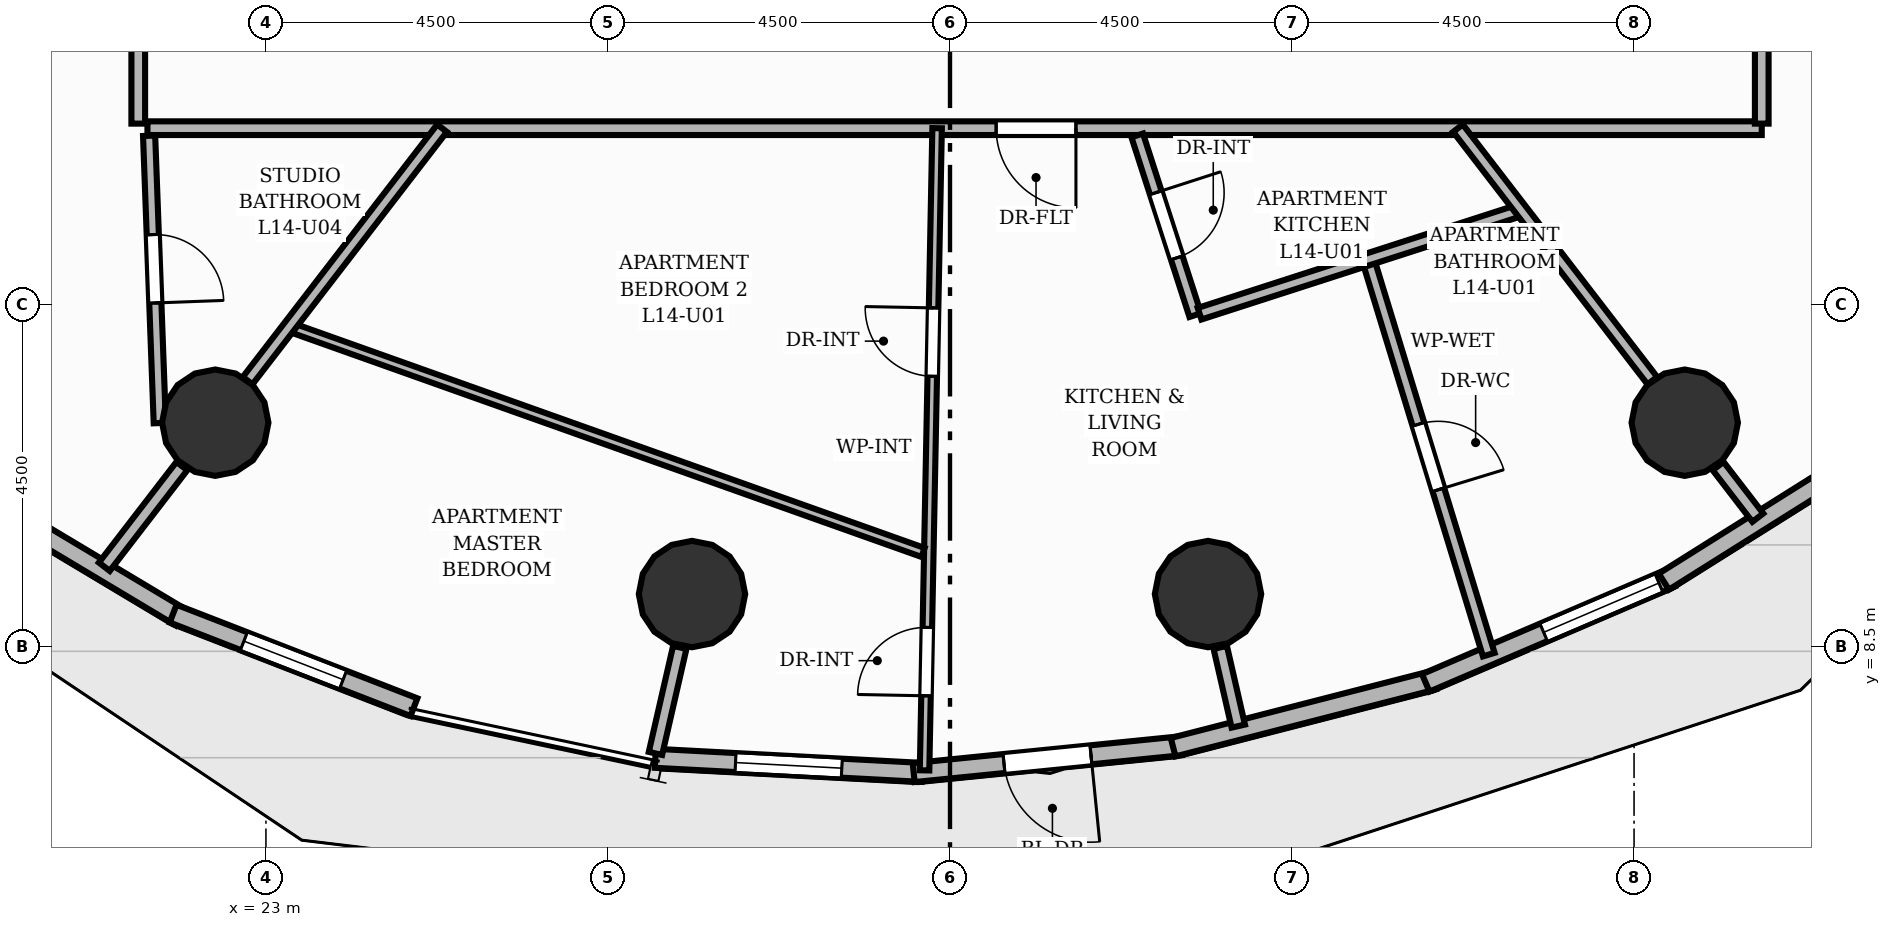
"""IFC4 building model, lengths in metres.
Left out: names, types, materials, properties, quantities, classifications, styles, units other than length and angle.
Written with IfcOpenShell. Run it as: python <this file> out.ifc"""

import sys

from ifc_helpers import new_model, si_unit, direction, frame, frame_2d, origin, origin_2d, place, context, subcontext, project, spatial, rectangle, circle, extrude, element, fill, save


model = new_model("IFC4")
c1 = context("Model", 3, precision=1e-05, world=origin(), true_north=direction((0.0, 1.0)))
c2 = subcontext(c1, "Body", "Model", "MODEL_VIEW")
j1 = project(units=[si_unit("LENGTHUNIT", "METRE"), si_unit("PLANEANGLEUNIT", "RADIAN")], contexts=[c1])
p1 = place(None, origin())
s1 = spatial("IfcSite", under=j1, at=p1, CompositionType="ELEMENT")
p2 = place(p1, origin())
s2 = spatial("IfcBuilding", under=s1, at=p2, CompositionType="ELEMENT")
p3 = place(p2, frame((0.0, 0.0, 50.4)))
s3 = spatial("IfcBuildingStorey", under=s2, at=p3, CompositionType="ELEMENT", Elevation=50.4)
for number, where, z_axis, x_axis in (
    (1, (22.333, 11.445, 0.0), (0.0, 0.0, 1.0), (1.0, 0.0, 0.0)),
    (2, (28.605, 9.19, 0.0), (0.0, 0.0, 1.0), (1.0, 0.0, 0.0)),
    (3, (35.395, 9.19, 0.0), (0.0, 0.0, 1.0), (1.0, 0.0, 0.0)),
    (4, (41.667, 11.445, 0.0), (0.0, 0.0, 1.0), (1.0, 0.0, 0.0)),
):
    element("IfcColumn", number, at=place(p3, frame(where, z_axis=z_axis, x_axis=x_axis)), inside=s3, PredefinedType="COLUMN", context=c2, shape_type="SweptSolid", body=[
        extrude(circle(Radius=0.7, at=origin_2d()), origin(), (0.0, 0.0, 1.0), 3.2),
    ])
p4 = place(p3, frame((21.878, 8.884, 0.0), z_axis=(0.0, 0.0, 1.0), x_axis=(-0.858069400356, 0.513533742001, 0.0)))
e5 = element("IfcWall", 5, at=p4, inside=s3, PredefinedType="SOLIDWALL", context=c2, shape_type="SweptSolid", body=[
    extrude(rectangle(XDim=3.323, YDim=0.25, at=frame_2d((1.661, 0.0))), origin(), (0.0, 0.0, 1.0), 2.96),
])
p5 = place(p3, frame((24.947, 7.702, 0.0), z_axis=(0.0, 0.0, 1.0), x_axis=(-0.932140755825, 0.362096135479, 0.0)))
e6 = element("IfcWall", 6, at=p5, inside=s3, PredefinedType="SOLIDWALL", context=c2, shape_type="SweptSolid", body=[
    extrude(rectangle(XDim=3.399, YDim=0.25, at=frame_2d((1.699, 0.0))), origin(), (0.0, 0.0, 1.0), 2.96),
])
p6 = place(p5, frame((1.0, 0.0, 0.85)))
e7 = element("IfcOpeningElement", 7, at=p6, cuts=e6, PredefinedType="OPENING", context=c2, shape_type="SweptSolid", body=[
    extrude(rectangle(XDim=1.4, YDim=1.55, at=frame_2d((0.7, 0.775))), frame((0.0, 0.135, 0.0), z_axis=(0.0, -1.0, 0.0), x_axis=(1.0, 0.0, 0.0)), (0.0, 0.0, 1.0), 0.27),
])
p7 = place(p3, frame((31.631, 6.844, 0.0), z_axis=(0.0, 0.0, 1.0), x_axis=(-0.99860782827, 0.052748510102, 0.0)))
e8 = element("IfcWall", 8, at=p7, inside=s3, PredefinedType="SOLIDWALL", context=c2, shape_type="SweptSolid", body=[
    extrude(rectangle(XDim=3.513, YDim=0.25, at=frame_2d((1.756, 0.0))), origin(), (0.0, 0.0, 1.0), 2.96),
])
p8 = place(p7, frame((1.056, 0.0, 0.85)))
e9 = element("IfcOpeningElement", 9, at=p8, cuts=e8, PredefinedType="OPENING", context=c2, shape_type="SweptSolid", body=[
    extrude(rectangle(XDim=1.4, YDim=1.55, at=frame_2d((0.7, 0.775))), frame((0.0, 0.135, 0.0), z_axis=(0.0, -1.0, 0.0), x_axis=(1.0, 0.0, 0.0)), (0.0, 0.0, 1.0), 0.27),
])
p9 = place(p3, frame((35.043, 7.194, 0.0), z_axis=(0.0, 0.0, 1.0), x_axis=(-0.994996115016, -0.099913618207, 0.0)))
e10 = element("IfcWall", 10, at=p9, inside=s3, PredefinedType="SOLIDWALL", context=c2, shape_type="SweptSolid", body=[
    extrude(rectangle(XDim=3.538, YDim=0.25, at=frame_2d((1.769, 0.0))), origin(), (0.0, 0.0, 1.0), 2.96),
])
p10 = place(p9, frame((1.194, 0.0, 0.0)))
e11 = element("IfcOpeningElement", 11, at=p10, cuts=e10, PredefinedType="OPENING", context=c2, shape_type="SweptSolid", body=[
    extrude(rectangle(XDim=1.15, YDim=2.2, at=frame_2d((0.575, 1.1))), frame((0.0, 0.135, 0.0), z_axis=(0.0, -1.0, 0.0), x_axis=(1.0, 0.0, 0.0)), (0.0, 0.0, 1.0), 0.27),
])
p11 = place(p3, frame((38.362, 8.057, 0.0), z_axis=(0.0, 0.0, 1.0), x_axis=(-0.968459637573, -0.249170484594, 0.0)))
e12 = element("IfcWall", 12, at=p11, inside=s3, PredefinedType="SOLIDWALL", context=c2, shape_type="SweptSolid", body=[
    extrude(rectangle(XDim=3.538, YDim=0.25, at=frame_2d((1.769, 0.0))), origin(), (0.0, 0.0, 1.0), 2.96),
])
p12 = place(p3, frame((41.489, 9.405, 0.0), z_axis=(0.0, 0.0, 1.0), x_axis=(-0.919263615987, -0.393642482872, 0.0)))
e13 = element("IfcWall", 13, at=p12, inside=s3, PredefinedType="SOLIDWALL", context=c2, shape_type="SweptSolid", body=[
    extrude(rectangle(XDim=3.513, YDim=0.25, at=frame_2d((1.756, 0.0))), origin(), (0.0, 0.0, 1.0), 2.96),
])
p13 = place(p12, frame((0.175, 0.0, 0.85)))
e14 = element("IfcOpeningElement", 14, at=p13, cuts=e13, PredefinedType="OPENING", context=c2, shape_type="SweptSolid", body=[
    extrude(rectangle(XDim=1.65, YDim=1.55, at=frame_2d((0.825, 0.775))), frame((0.0, 0.135, 0.0), z_axis=(0.0, -1.0, 0.0), x_axis=(1.0, 0.0, 0.0)), (0.0, 0.0, 1.0), 0.27),
])
p14 = place(p3, frame((44.326, 11.197, 0.0), z_axis=(0.0, 0.0, 1.0), x_axis=(-0.846852351865, -0.531828068215, 0.0)))
e15 = element("IfcWall", 15, at=p14, inside=s3, PredefinedType="SOLIDWALL", context=c2, shape_type="SweptSolid", body=[
    extrude(rectangle(XDim=3.465, YDim=0.25, at=frame_2d((1.732, 0.0))), origin(), (0.0, 0.0, 1.0), 2.96),
])
p15 = place(p3, frame((21.894, 10.874, 0.0), z_axis=(0.0, 0.0, 1.0), x_axis=(-0.610021184497, -0.792385104898, 0.0)))
e16 = element("IfcWall", 16, at=p15, inside=s3, PredefinedType="PARTITIONING", context=c2, shape_type="SweptSolid", body=[
    extrude(rectangle(XDim=1.672, YDim=0.18, at=frame_2d((0.836, 0.0))), origin(), (0.0, 0.0, 1.0), 2.178),
])
p16 = place(p3, frame((28.445, 8.488, 0.0), z_axis=(0.0, 0.0, 1.0), x_axis=(-0.223463944202, -0.974712196313, 0.0)))
e17 = element("IfcWall", 17, at=p16, inside=s3, PredefinedType="PARTITIONING", context=c2, shape_type="SweptSolid", body=[
    extrude(rectangle(XDim=1.431, YDim=0.18, at=frame_2d((0.716, 0.0))), origin(), (0.0, 0.0, 1.0), 2.178),
])
p17 = place(p3, frame((35.555, 8.488, 0.0), z_axis=(0.0, 0.0, 1.0), x_axis=(0.223348866575, -0.974738572028, 0.0)))
e18 = element("IfcWall", 18, at=p17, inside=s3, PredefinedType="PARTITIONING", context=c2, shape_type="SweptSolid", body=[
    extrude(rectangle(XDim=1.062, YDim=0.18, at=frame_2d((0.531, 0.0))), origin(), (0.0, 0.0, 1.0), 2.178),
])
p18 = place(p3, frame((42.106, 10.874, 0.0), z_axis=(0.0, 0.0, 1.0), x_axis=(0.610124026743, -0.792305920709, 0.0)))
e19 = element("IfcWall", 19, at=p18, inside=s3, PredefinedType="PARTITIONING", context=c2, shape_type="SweptSolid", body=[
    extrude(rectangle(XDim=0.856, YDim=0.18, at=frame_2d((0.428, 0.0))), origin(), (0.0, 0.0, 1.0), 2.178),
])
p19 = place(p3, frame((42.68, 15.32, 0.0), z_axis=(0.0, 0.0, 1.0), x_axis=(-1.0, 0.0, 0.0)))
e20 = element("IfcWall", 20, at=p19, inside=s3, PredefinedType="PARTITIONING", context=c2, shape_type="SweptSolid", body=[
    extrude(rectangle(XDim=21.239, YDim=0.18, at=frame_2d((10.619, 0.0))), origin(), (0.0, 0.0, 1.0), 2.955),
])
p20 = place(p19, frame((9.023, 0.0, 0.0)))
e21 = element("IfcOpeningElement", 21, at=p20, cuts=e20, PredefinedType="OPENING", context=c2, shape_type="SweptSolid", body=[
    extrude(rectangle(XDim=1.05, YDim=2.15, at=frame_2d((0.525, 1.075))), frame((0.0, 0.1, 0.0), z_axis=(0.0, -1.0, 0.0), x_axis=(1.0, 0.0, 0.0)), (0.0, 0.0, 1.0), 0.2),
])
p21 = place(p3, frame((42.68, 32.62, 0.0), z_axis=(0.0, 0.0, 1.0), x_axis=(0.0, -1.0, 0.0)))
e22 = element("IfcWall", 22, at=p21, inside=s3, PredefinedType="PARTITIONING", context=c2, shape_type="SweptSolid", body=[
    extrude(rectangle(XDim=17.24, YDim=0.18, at=frame_2d((8.62, 0.0))), origin(), (0.0, 0.0, 1.0), 2.955),
])
p22 = place(p21, frame((8.095, 0.0, 0.0)))
e23 = element("IfcOpeningElement", 23, at=p22, cuts=e22, PredefinedType="OPENING", context=c2, shape_type="SweptSolid", body=[
    extrude(rectangle(XDim=1.05, YDim=2.15, at=frame_2d((0.525, 1.075))), frame((0.0, 0.1, 0.0), z_axis=(0.0, -1.0, 0.0), x_axis=(1.0, 0.0, 0.0)), (0.0, 0.0, 1.0), 0.2),
])
p23 = place(p3, frame((21.32, 15.38, 0.0), z_axis=(0.0, 0.0, 1.0), x_axis=(0.0, 1.0, 0.0)))
e24 = element("IfcWall", 24, at=p23, inside=s3, PredefinedType="PARTITIONING", context=c2, shape_type="SweptSolid", body=[
    extrude(rectangle(XDim=17.3, YDim=0.18, at=frame_2d((8.65, 0.0))), origin(), (0.0, 0.0, 1.0), 2.955),
])
p24 = place(p23, frame((8.125, 0.0, 0.0)))
e25 = element("IfcOpeningElement", 25, at=p24, cuts=e24, PredefinedType="OPENING", context=c2, shape_type="SweptSolid", body=[
    extrude(rectangle(XDim=1.05, YDim=2.15, at=frame_2d((0.525, 1.075))), frame((0.0, 0.1, 0.0), z_axis=(0.0, -1.0, 0.0), x_axis=(1.0, 0.0, 0.0)), (0.0, 0.0, 1.0), 0.2),
])
p25 = place(p3, frame((37.5, 13.594, 0.0), z_axis=(0.0, 0.0, 1.0), x_axis=(0.292167210162, -0.956367252318, 0.0)))
e26 = element("IfcWall", 26, at=p25, inside=s3, PredefinedType="PLUMBINGWALL", context=c2, shape_type="SweptSolid", body=[
    extrude(rectangle(XDim=5.438, YDim=0.16, at=frame_2d((2.719, 0.0))), origin(), (0.0, 0.0, 1.0), 2.955),
])
p26 = place(p25, frame((2.269, 0.0, 0.0)))
e27 = element("IfcOpeningElement", 27, at=p26, cuts=e26, PredefinedType="OPENING", context=c2, shape_type="SweptSolid", body=[
    extrude(rectangle(XDim=0.9, YDim=2.1, at=frame_2d((0.45, 1.05))), frame((0.0, 0.09, 0.0), z_axis=(0.0, -1.0, 0.0), x_axis=(1.0, 0.0, 0.0)), (0.0, 0.0, 1.0), 0.18),
])
p27 = place(p3, frame((31.665, 6.87, 0.0), z_axis=(0.0, 0.0, 1.0), x_axis=(0.019528202577, 0.99980930647, 0.0)))
e28 = element("IfcWall", 28, at=p27, inside=s3, PredefinedType="PARTITIONING", context=c2, shape_type="SweptSolid", body=[
    extrude(rectangle(XDim=8.451, YDim=0.125, at=frame_2d((4.226, 0.0))), origin(), (0.0, 0.0, 1.0), 2.955),
])
p28 = place(p27, frame((0.981, 0.0, 0.0)))
e29 = element("IfcOpeningElement", 29, at=p28, cuts=e28, PredefinedType="OPENING", context=c2, shape_type="SweptSolid", body=[
    extrude(rectangle(XDim=0.9, YDim=2.1, at=frame_2d((0.45, 1.05))), frame((0.0, 0.073, 0.0), z_axis=(0.0, -1.0, 0.0), x_axis=(1.0, 0.0, 0.0)), (0.0, 0.0, 1.0), 0.145),
])
p29 = place(p27, frame((5.186, 0.0, 0.0)))
e30 = element("IfcOpeningElement", 30, at=p29, cuts=e28, PredefinedType="OPENING", context=c2, shape_type="SweptSolid", body=[
    extrude(rectangle(XDim=0.9, YDim=2.1, at=frame_2d((0.45, 1.05))), frame((0.0, 0.073, 0.0), z_axis=(0.0, -1.0, 0.0), x_axis=(1.0, 0.0, 0.0)), (0.0, 0.0, 1.0), 0.145),
])
p30 = place(p3, frame((34.463, 15.225, 0.0), z_axis=(0.0, 0.0, 1.0), x_axis=(0.307163549255, -0.951656741693, 0.0)))
e31 = element("IfcWall", 31, at=p30, inside=s3, PredefinedType="PLUMBINGWALL", context=c2, shape_type="SweptSolid", body=[
    extrude(rectangle(XDim=2.485, YDim=0.16, at=frame_2d((1.242, 0.0))), origin(), (0.0, 0.0, 1.0), 2.955),
])
p31 = place(p30, frame((0.792, 0.0, 0.0)))
e32 = element("IfcOpeningElement", 32, at=p31, cuts=e31, PredefinedType="OPENING", context=c2, shape_type="SweptSolid", body=[
    extrude(rectangle(XDim=0.9, YDim=2.1, at=frame_2d((0.45, 1.05))), frame((0.0, 0.09, 0.0), z_axis=(0.0, -1.0, 0.0), x_axis=(1.0, 0.0, 0.0)), (0.0, 0.0, 1.0), 0.18),
])
p32 = place(p3, frame((35.284, 12.879, 0.0), z_axis=(0.0, 0.0, 1.0), x_axis=(0.951640751353, 0.307213086253, 0.0)))
e33 = element("IfcWall", 33, at=p32, inside=s3, PredefinedType="PLUMBINGWALL", context=c2, shape_type="SweptSolid", body=[
    extrude(rectangle(XDim=4.443, YDim=0.16, at=frame_2d((2.222, 0.0))), origin(), (0.0, 0.0, 1.0), 2.955),
])
p33 = place(p3, frame((38.683, 15.32, 0.0), z_axis=(0.0, 0.0, 1.0), x_axis=(0.610070932863, -0.792346803411, 0.0)))
e34 = element("IfcWall", 34, at=p33, inside=s3, PredefinedType="PLUMBINGWALL", context=c2, shape_type="SweptSolid", body=[
    extrude(rectangle(XDim=4.192, YDim=0.16, at=frame_2d((2.096, 0.0))), origin(), (0.0, 0.0, 1.0), 2.178),
])
p34 = place(p3, frame((23.305, 12.707, 0.0), z_axis=(0.0, 0.0, 1.0), x_axis=(0.942091409395, -0.33535619324, 0.0)))
e35 = element("IfcWall", 35, at=p34, inside=s3, PredefinedType="PARTITIONING", context=c2, shape_type="SweptSolid", body=[
    extrude(rectangle(XDim=8.853, YDim=0.125, at=frame_2d((4.427, 0.0))), origin(), (0.0, 0.0, 1.0), 2.955),
])
p35 = place(p3, frame((22.759, 11.998, 0.0), z_axis=(0.0, 0.0, 1.0), x_axis=(0.610070932863, 0.792346803411, 0.0)))
e36 = element("IfcWall", 36, at=p35, inside=s3, PredefinedType="PLUMBINGWALL", context=c2, shape_type="SweptSolid", body=[
    extrude(rectangle(XDim=4.192, YDim=0.16, at=frame_2d((2.096, 0.0))), origin(), (0.0, 0.0, 1.0), 2.178),
])
p36 = place(p3, frame((21.463, 15.22, 0.0), z_axis=(0.0, 0.0, 1.0), x_axis=(0.037109528702, -0.99931120422, 0.0)))
e37 = element("IfcWall", 37, at=p36, inside=s3, PredefinedType="PLUMBINGWALL", context=c2, shape_type="SweptSolid", body=[
    extrude(rectangle(XDim=3.783, YDim=0.16, at=frame_2d((1.892, 0.0))), origin(), (0.0, 0.0, 1.0), 2.955),
])
p37 = place(p36, frame((1.302, 0.0, 0.0)))
e38 = element("IfcOpeningElement", 38, at=p37, cuts=e37, PredefinedType="OPENING", context=c2, shape_type="SweptSolid", body=[
    extrude(rectangle(XDim=0.9, YDim=2.1, at=frame_2d((0.45, 1.05))), frame((0.0, 0.09, 0.0), z_axis=(0.0, -1.0, 0.0), x_axis=(1.0, 0.0, 0.0)), (0.0, 0.0, 1.0), 0.18),
])
p38 = place(p10, origin())
e39 = element("IfcDoor", 39, at=p38, inside=s3, OperationType="SINGLE_SWING_LEFT", PredefinedType="DOOR", context=c2, shape_type="SweptSolid", body=[
    extrude(rectangle(XDim=1.15, YDim=2.2, at=frame_2d((0.575, 1.1))), frame((0.0, 0.025, 0.0), z_axis=(0.0, -1.0, 0.0), x_axis=(1.0, 0.0, 0.0)), (0.0, 0.0, 1.0), 0.05),
])
fill(e11, e39)
p39 = place(p6, origin())
e40 = element("IfcWindow", 40, at=p39, inside=s3, PartitioningType="SINGLE_PANEL", PredefinedType="WINDOW", context=c2, shape_type="SweptSolid", body=[
    extrude(rectangle(XDim=1.4, YDim=1.55, at=frame_2d((0.7, 0.775))), frame((0.0, 0.03, 0.0), z_axis=(0.0, -1.0, 0.0), x_axis=(1.0, 0.0, 0.0)), (0.0, 0.0, 1.0), 0.06),
])
fill(e7, e40)
p40 = place(p8, origin())
e41 = element("IfcWindow", 41, at=p40, inside=s3, PartitioningType="SINGLE_PANEL", PredefinedType="WINDOW", context=c2, shape_type="SweptSolid", body=[
    extrude(rectangle(XDim=1.4, YDim=1.55, at=frame_2d((0.7, 0.775))), frame((0.0, 0.03, 0.0), z_axis=(0.0, -1.0, 0.0), x_axis=(1.0, 0.0, 0.0)), (0.0, 0.0, 1.0), 0.06),
])
fill(e9, e41)
p41 = place(p13, origin())
e42 = element("IfcWindow", 42, at=p41, inside=s3, PartitioningType="SINGLE_PANEL", PredefinedType="WINDOW", context=c2, shape_type="SweptSolid", body=[
    extrude(rectangle(XDim=1.65, YDim=1.55, at=frame_2d((0.825, 0.775))), frame((0.0, 0.03, 0.0), z_axis=(0.0, -1.0, 0.0), x_axis=(1.0, 0.0, 0.0)), (0.0, 0.0, 1.0), 0.06),
])
fill(e14, e42)
p42 = place(p20, origin())
e43 = element("IfcDoor", 43, at=p42, inside=s3, OperationType="SINGLE_SWING_LEFT", PredefinedType="DOOR", context=c2, shape_type="SweptSolid", body=[
    extrude(rectangle(XDim=1.05, YDim=2.15, at=frame_2d((0.525, 1.075))), frame((0.0, 0.025, 0.0), z_axis=(0.0, -1.0, 0.0), x_axis=(1.0, 0.0, 0.0)), (0.0, 0.0, 1.0), 0.05),
])
fill(e21, e43)
p43 = place(p26, origin())
e44 = element("IfcDoor", 44, at=p43, inside=s3, OperationType="SINGLE_SWING_RIGHT", PredefinedType="DOOR", context=c2, shape_type="SweptSolid", body=[
    extrude(rectangle(XDim=0.9, YDim=2.1, at=frame_2d((0.45, 1.05))), frame((0.0, 0.025, 0.0), z_axis=(0.0, -1.0, 0.0), x_axis=(1.0, 0.0, 0.0)), (0.0, 0.0, 1.0), 0.05),
])
fill(e27, e44)
p44 = place(p28, origin())
e45 = element("IfcDoor", 45, at=p44, inside=s3, OperationType="SINGLE_SWING_LEFT", PredefinedType="DOOR", context=c2, shape_type="SweptSolid", body=[
    extrude(rectangle(XDim=0.9, YDim=2.1, at=frame_2d((0.45, 1.05))), frame((0.0, 0.025, 0.0), z_axis=(0.0, -1.0, 0.0), x_axis=(1.0, 0.0, 0.0)), (0.0, 0.0, 1.0), 0.05),
])
fill(e29, e45)
p45 = place(p29, origin())
e46 = element("IfcDoor", 46, at=p45, inside=s3, OperationType="SINGLE_SWING_RIGHT", PredefinedType="DOOR", context=c2, shape_type="SweptSolid", body=[
    extrude(rectangle(XDim=0.9, YDim=2.1, at=frame_2d((0.45, 1.05))), frame((0.0, 0.025, 0.0), z_axis=(0.0, -1.0, 0.0), x_axis=(1.0, 0.0, 0.0)), (0.0, 0.0, 1.0), 0.05),
])
fill(e30, e46)
p46 = place(p31, origin())
e47 = element("IfcDoor", 47, at=p46, inside=s3, OperationType="SINGLE_SWING_LEFT", PredefinedType="DOOR", context=c2, shape_type="SweptSolid", body=[
    extrude(rectangle(XDim=0.9, YDim=2.1, at=frame_2d((0.45, 1.05))), frame((0.0, 0.025, 0.0), z_axis=(0.0, -1.0, 0.0), x_axis=(1.0, 0.0, 0.0)), (0.0, 0.0, 1.0), 0.05),
])
fill(e32, e47)
p47 = place(p37, origin())
e48 = element("IfcDoor", 48, at=p47, inside=s3, OperationType="SINGLE_SWING_RIGHT", PredefinedType="DOOR", context=c2, shape_type="SweptSolid", body=[
    extrude(rectangle(XDim=0.9, YDim=2.1, at=frame_2d((0.45, 1.05))), frame((0.0, 0.025, 0.0), z_axis=(0.0, -1.0, 0.0), x_axis=(1.0, 0.0, 0.0)), (0.0, 0.0, 1.0), 0.05),
])
fill(e38, e48)
save(model, sys.argv[1])
